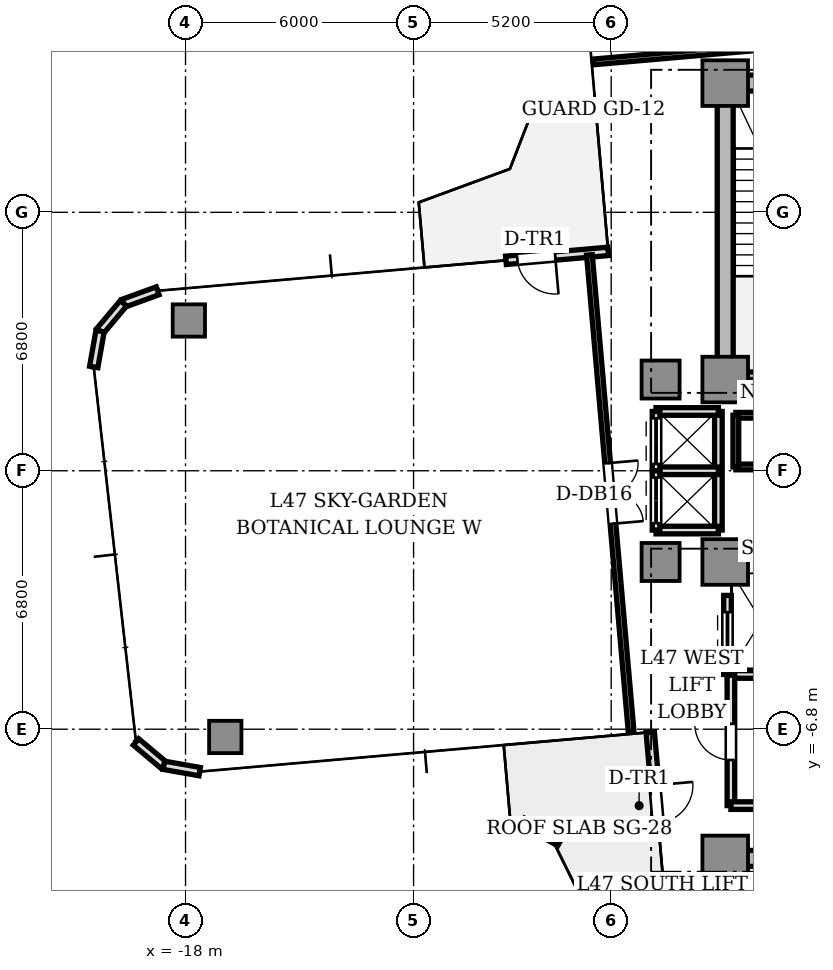
"""IFC4 building model, lengths in metres.
Left out: names, types, materials, properties, quantities, classifications, styles, units other than length and angle.
Written with IfcOpenShell. Run it as: python <this file> out.ifc"""

import sys

from ifc_helpers import new_model, si_unit, direction, frame, frame_2d, origin, origin_2d, place, context, subcontext, project, spatial, rectangle, extrude, source, transform, mapped, element, fill, save


model = new_model("IFC4")
c1 = context("Model", 3, precision=1e-05, world=origin(), true_north=direction((0.0, 1.0)))
c2 = subcontext(c1, "Body", "Model", "MODEL_VIEW")
j1 = project(units=[si_unit("LENGTHUNIT", "METRE"), si_unit("PLANEANGLEUNIT", "RADIAN")], contexts=[c1])
p1 = place(None, origin())
s1 = spatial("IfcSite", under=j1, at=p1, CompositionType="ELEMENT")
p2 = place(p1, origin())
s2 = spatial("IfcBuilding", under=s1, at=p2, CompositionType="ELEMENT")
p3 = place(p2, frame((0.0, 0.0, 170.7)))
s3 = spatial("IfcBuildingStorey", under=s2, at=p3, CompositionType="ELEMENT", Elevation=170.7)
p4 = place(p3, frame((-3.55, 10.2, 0.0), z_axis=(0.0, 0.0, 1.0), x_axis=(1.0, 0.0, 0.0)))
e1 = element("IfcWall", 1, at=p4, inside=s3, PredefinedType="SHEAR", context=c2, shape_type="SweptSolid", body=[
    extrude(rectangle(XDim=7.1, YDim=0.42, at=frame_2d((3.55, 0.0))), origin(), (0.0, 0.0, 1.0), 4.26),
])
p5 = place(p3, frame((-3.8, 2.85, 0.0), z_axis=(0.0, 0.0, 1.0), x_axis=(0.0, 1.0, 0.0)))
e2 = element("IfcWall", 2, at=p5, inside=s3, PredefinedType="SHEAR", context=c2, shape_type="SweptSolid", body=[
    extrude(rectangle(XDim=6.9, YDim=0.42, at=frame_2d((3.45, 0.0))), origin(), (0.0, 0.0, 1.0), 4.26),
])
p6 = place(p3, frame((-3.55, -10.2, 0.0), z_axis=(0.0, 0.0, 1.0), x_axis=(1.0, 0.0, 0.0)))
e3 = element("IfcWall", 3, at=p6, inside=s3, PredefinedType="SHEAR", context=c2, shape_type="SweptSolid", body=[
    extrude(rectangle(XDim=7.1, YDim=0.42, at=frame_2d((3.55, 0.0))), origin(), (0.0, 0.0, 1.0), 4.26),
])
m1 = source(origin(), c2, "Body", "SweptSolid", [
    extrude(rectangle(XDim=1.2, YDim=1.2, at=origin_2d()), origin(), (0.0, 0.0, 1.0), 4.26),
])
for number, where, z_axis, x_axis in (
    (4, (-3.8, 2.4, 0.0), (0.0, 0.0, 1.0), (1.0, 0.0, 0.0)),
    (5, (-3.8, 10.2, 0.0), (0.0, 0.0, 1.0), (1.0, 0.0, 0.0)),
    (6, (-3.8, -2.4, 0.0), (0.0, 0.0, 1.0), (1.0, 0.0, 0.0)),
    (7, (-3.8, -10.2, 0.0), (0.0, 0.0, 1.0), (1.0, 0.0, 0.0)),
):
    element("IfcColumn", number, at=place(p3, frame(where, z_axis=z_axis, x_axis=x_axis)), inside=s3, PredefinedType="COLUMN", context=c2, shape_type="MappedRepresentation", body=[
        mapped(m1, transform((0.0, 0.0, 0.0), scale=1.0)),
    ])
m2 = source(origin(), c2, "Body", "SweptSolid", [
    extrude(rectangle(XDim=1.0, YDim=1.0, at=origin_2d()), origin(), (0.0, 0.0, 1.0), 4.26),
])
for number, where, z_axis, x_axis in (
    (8, (-5.5, 2.4, 0.0), (0.0, 0.0, 1.0), (1.0, 0.0, 0.0)),
    (9, (-5.5, -2.4, 0.0), (0.0, 0.0, 1.0), (1.0, 0.0, 0.0)),
):
    element("IfcColumn", number, at=place(p3, frame(where, z_axis=z_axis, x_axis=x_axis)), inside=s3, PredefinedType="COLUMN", context=c2, shape_type="MappedRepresentation", body=[
        mapped(m2, transform((0.0, 0.0, 0.0), scale=1.0)),
    ])
m3 = source(origin(), c2, "Body", "SweptSolid", [
    extrude(rectangle(XDim=0.85, YDim=0.85, at=origin_2d()), origin(), (0.0, 0.0, 1.0), 4.26),
])
for number, where, z_axis, x_axis in (
    (10, (-17.913, 3.954, 0.0), (0.0, 0.0, 1.0), (1.0, 0.0, 0.0)),
    (11, (-16.954, -7.004, 0.0), (0.0, 0.0, 1.0), (1.0, 0.0, 0.0)),
):
    element("IfcColumn", number, at=place(p3, frame(where, z_axis=z_axis, x_axis=x_axis)), inside=s3, PredefinedType="COLUMN", context=c2, shape_type="MappedRepresentation", body=[
        mapped(m3, transform((0.0, 0.0, 0.0), scale=1.0)),
    ])
p7 = place(p3, frame((-6.879, 5.772, 0.0), z_axis=(0.0, 0.0, 1.0), x_axis=(-0.996193619346, -0.087168071984, 0.0)))
e12 = element("IfcWall", 12, at=p7, inside=s3, PredefinedType="STANDARD", context=c2, shape_type="SweptSolid", body=[
    extrude(rectangle(XDim=2.7, YDim=0.22, at=frame_2d((1.35, 0.0))), origin(), (0.0, 0.0, 1.0), 4.26),
])
p8 = place(p7, frame((1.4, 0.0, 0.0)))
e13 = element("IfcOpeningElement", 13, at=p8, cuts=e12, PredefinedType="OPENING", context=c2, shape_type="SweptSolid", body=[
    extrude(rectangle(XDim=1.0, YDim=2.2, at=frame_2d((0.5, 1.1))), frame((0.0, 0.12, 0.0), z_axis=(0.0, -1.0, 0.0), x_axis=(1.0, 0.0, 0.0)), (0.0, 0.0, 1.0), 0.24),
])
p9 = place(p3, frame((-18.734, 4.735, 0.0), z_axis=(0.0, 0.0, 1.0), x_axis=(-0.939741306239, -0.34188635151, 0.0)))
e14 = element("IfcWall", 14, at=p9, inside=s3, PredefinedType="STANDARD", context=c2, shape_type="SweptSolid", body=[
    extrude(rectangle(XDim=0.958, YDim=0.22, at=frame_2d((0.479, 0.0))), origin(), (0.0, 0.0, 1.0), 4.26),
])
for number, where, z_axis, x_axis in (
    (15, (-19.634, 4.408, 0.0), (0.0, 0.0, 1.0), (-0.643, -0.766, 0.0)),
    (16, (-20.25, 3.674, 0.0), (0.0, 0.0, 1.0), (-0.174, -0.985, 0.0)),
):
    element("IfcWall", number, at=place(p3, frame(where, z_axis=z_axis, x_axis=x_axis)), inside=s3, PredefinedType="STANDARD", context=c2, shape_type="SweptSolid", body=[
        extrude(rectangle(XDim=0.958, YDim=0.22, at=frame_2d((0.479, 0.0))), origin(), (0.0, 0.0, 1.0), 4.26),
    ])
p10 = place(p3, frame((-19.304, -7.135, 0.0), z_axis=(0.0, 0.0, 1.0), x_axis=(0.766001159887, -0.642839189107, 0.0)))
e17 = element("IfcWall", 17, at=p10, inside=s3, PredefinedType="STANDARD", context=c2, shape_type="SweptSolid", body=[
    extrude(rectangle(XDim=0.958, YDim=0.22, at=frame_2d((0.479, 0.0))), origin(), (0.0, 0.0, 1.0), 4.26),
])
p11 = place(p3, frame((-18.57, -7.75, 0.0), z_axis=(0.0, 0.0, 1.0), x_axis=(0.984770724397, -0.173858046606, 0.0)))
e18 = element("IfcWall", 18, at=p11, inside=s3, PredefinedType="STANDARD", context=c2, shape_type="SweptSolid", body=[
    extrude(rectangle(XDim=0.958, YDim=0.22, at=frame_2d((0.479, 0.0))), origin(), (0.0, 0.0, 1.0), 4.26),
])
p12 = place(p3, frame((-5.772, -6.879, 0.0), z_axis=(0.0, 0.0, 1.0), x_axis=(0.087168071984, -0.996193619346, 0.0)))
e19 = element("IfcWall", 19, at=p12, inside=s3, PredefinedType="STANDARD", context=c2, shape_type="SweptSolid", body=[
    extrude(rectangle(XDim=2.7, YDim=0.22, at=frame_2d((1.35, 0.0))), origin(), (0.0, 0.0, 1.0), 4.26),
])
p13 = place(p12, frame((1.4, 0.0, 0.0)))
e20 = element("IfcOpeningElement", 20, at=p13, cuts=e19, PredefinedType="OPENING", context=c2, shape_type="SweptSolid", body=[
    extrude(rectangle(XDim=1.0, YDim=2.2, at=frame_2d((0.5, 1.1))), frame((0.0, 0.12, 0.0), z_axis=(0.0, -1.0, 0.0), x_axis=(1.0, 0.0, 0.0)), (0.0, 0.0, 1.0), 0.24),
])
p14 = place(p3, frame((-9.129, -9.23, 0.0), z_axis=(0.0, 0.0, 1.0), x_axis=(0.870497588791, -0.492172680986, 0.0)))
e21 = element("IfcWall", 21, at=p14, inside=s3, PredefinedType="PARAPET", context=c2, shape_type="SweptSolid", body=[
    extrude(rectangle(XDim=1.115, YDim=0.2, at=frame_2d((0.558, 0.0))), origin(), (0.0, 0.0, 1.0), 0.65),
])
p15 = place(p3, frame((-3.72, 2.5, 0.0), z_axis=(0.0, 0.0, 1.0), x_axis=(1.0, 0.0, 0.0)))
e22 = element("IfcWall", 22, at=p15, inside=s3, PredefinedType="SOLIDWALL", context=c2, shape_type="SweptSolid", body=[
    extrude(rectangle(XDim=3.72, YDim=0.2, at=frame_2d((1.86, 0.0))), origin(), (0.0, 0.0, 1.0), 4.26),
])
p16 = place(p3, frame((-3.74, -5.36, 0.0), z_axis=(0.0, 0.0, 1.0), x_axis=(1.0, 0.0, 0.0)))
e23 = element("IfcWall", 23, at=p16, inside=s3, PredefinedType="SOLIDWALL", context=c2, shape_type="SweptSolid", body=[
    extrude(rectangle(XDim=1.74, YDim=0.2, at=frame_2d((0.87, 0.0))), origin(), (0.0, 0.0, 1.0), 3.81),
])
p17 = place(p3, frame((-3.74, -5.36, 0.0), z_axis=(0.0, 0.0, 1.0), x_axis=(0.0, 1.0, 0.0)))
e24 = element("IfcWall", 24, at=p17, inside=s3, PredefinedType="SOLIDWALL", context=c2, shape_type="SweptSolid", body=[
    extrude(rectangle(XDim=2.08, YDim=0.2, at=frame_2d((1.04, 0.0))), origin(), (0.0, 0.0, 1.0), 3.81),
])
p18 = place(p17, frame((0.44, 0.0, 0.0)))
e25 = element("IfcOpeningElement", 25, at=p18, cuts=e24, PredefinedType="OPENING", context=c2, shape_type="SweptSolid", body=[
    extrude(rectangle(XDim=1.2, YDim=2.2, at=frame_2d((0.6, 1.1))), frame((0.0, 0.11, 0.0), z_axis=(0.0, -1.0, 0.0), x_axis=(1.0, 0.0, 0.0)), (0.0, 0.0, 1.0), 0.22),
])
p19 = place(p3, frame((-3.98, -1.56, 0.0), z_axis=(0.0, 0.0, 1.0), x_axis=(0.0, 1.0, 0.0)))
e26 = element("IfcWall", 26, at=p19, inside=s3, PredefinedType="SOLIDWALL", context=c2, shape_type="SweptSolid", body=[
    extrude(rectangle(XDim=3.12, YDim=0.2, at=frame_2d((1.56, 0.0))), origin(), (0.0, 0.0, 1.0), 3.43),
])
for number, where, z_axis, x_axis in (
    (27, (-5.62, 1.56, 0.0), (0.0, 0.0, 1.0), (1.0, 0.0, 0.0)),
    (28, (-5.62, -1.56, 0.0), (0.0, 0.0, 1.0), (1.0, 0.0, 0.0)),
    (29, (-5.62, 0.0, 0.0), (0.0, 0.0, 1.0), (1.0, 0.0, 0.0)),
):
    element("IfcWall", number, at=place(p3, frame(where, z_axis=z_axis, x_axis=x_axis)), inside=s3, PredefinedType="SOLIDWALL", context=c2, shape_type="SweptSolid", body=[
        extrude(rectangle(XDim=1.64, YDim=0.2, at=frame_2d((0.82, 0.0))), origin(), (0.0, 0.0, 1.0), 3.81),
    ])
p20 = place(p3, frame((-5.62, 0.0, 0.0), z_axis=(0.0, 0.0, 1.0), x_axis=(0.0, 1.0, 0.0)))
e30 = element("IfcWall", 30, at=p20, inside=s3, PredefinedType="SOLIDWALL", context=c2, shape_type="SweptSolid", body=[
    extrude(rectangle(XDim=1.56, YDim=0.2, at=frame_2d((0.78, 0.0))), origin(), (0.0, 0.0, 1.0), 3.81),
])
p21 = place(p20, frame((0.18, 0.0, 0.0)))
e31 = element("IfcOpeningElement", 31, at=p21, cuts=e30, PredefinedType="OPENING", context=c2, shape_type="SweptSolid", body=[
    extrude(rectangle(XDim=1.2, YDim=2.2, at=frame_2d((0.6, 1.1))), frame((0.0, 0.11, 0.0), z_axis=(0.0, -1.0, 0.0), x_axis=(1.0, 0.0, 0.0)), (0.0, 0.0, 1.0), 0.22),
])
p22 = place(p3, frame((-5.62, -1.56, 0.0), z_axis=(0.0, 0.0, 1.0), x_axis=(0.0, 1.0, 0.0)))
e32 = element("IfcWall", 32, at=p22, inside=s3, PredefinedType="SOLIDWALL", context=c2, shape_type="SweptSolid", body=[
    extrude(rectangle(XDim=1.56, YDim=0.2, at=frame_2d((0.78, 0.0))), origin(), (0.0, 0.0, 1.0), 3.81),
])
p23 = place(p22, frame((0.18, 0.0, 0.0)))
e33 = element("IfcOpeningElement", 33, at=p23, cuts=e32, PredefinedType="OPENING", context=c2, shape_type="SweptSolid", body=[
    extrude(rectangle(XDim=1.2, YDim=2.2, at=frame_2d((0.6, 1.1))), frame((0.0, 0.11, 0.0), z_axis=(0.0, -1.0, 0.0), x_axis=(1.0, 0.0, 0.0)), (0.0, 0.0, 1.0), 0.22),
])
p24 = place(p3, frame((-3.65, -8.81, 0.0), z_axis=(0.0, 0.0, 1.0), x_axis=(0.0, 1.0, 0.0)))
e34 = element("IfcWall", 34, at=p24, inside=s3, PredefinedType="SOLIDWALL", context=c2, shape_type="SweptSolid", body=[
    extrude(rectangle(XDim=3.43, YDim=0.2, at=frame_2d((1.715, 0.0))), origin(), (0.0, 0.0, 1.0), 3.81),
])
p25 = place(p24, frame((1.2, 0.0, 0.0)))
e35 = element("IfcOpeningElement", 35, at=p25, cuts=e34, PredefinedType="OPENING", context=c2, shape_type="SweptSolid", body=[
    extrude(rectangle(XDim=0.95, YDim=2.15, at=frame_2d((0.475, 1.075))), frame((0.0, 0.11, 0.0), z_axis=(0.0, -1.0, 0.0), x_axis=(1.0, 0.0, 0.0)), (0.0, 0.0, 1.0), 0.22),
])
p26 = place(p3, frame((-3.65, -8.81, 0.0), z_axis=(0.0, 0.0, 1.0), x_axis=(1.0, 0.0, 0.0)))
e36 = element("IfcWall", 36, at=p26, inside=s3, PredefinedType="SOLIDWALL", context=c2, shape_type="SweptSolid", body=[
    extrude(rectangle(XDim=1.67, YDim=0.2, at=frame_2d((0.835, 0.0))), origin(), (0.0, 0.0, 1.0), 3.81),
])
p27 = place(p3, frame((-3.52, 0.1, 0.0), z_axis=(0.0, 0.0, 1.0), x_axis=(1.0, 0.0, 0.0)))
e37 = element("IfcWall", 37, at=p27, inside=s3, PredefinedType="PARTITIONING", context=c2, shape_type="SweptSolid", body=[
    extrude(rectangle(XDim=5.68, YDim=0.15, at=frame_2d((2.84, 0.0))), origin(), (0.0, 0.0, 1.0), 3.81),
])
p28 = place(p3, frame((-3.52, 1.46, 0.0), z_axis=(0.0, 0.0, 1.0), x_axis=(1.0, 0.0, 0.0)))
e38 = element("IfcWall", 38, at=p28, inside=s3, PredefinedType="PARTITIONING", context=c2, shape_type="SweptSolid", body=[
    extrude(rectangle(XDim=5.68, YDim=0.15, at=frame_2d((2.84, 0.0))), origin(), (0.0, 0.0, 1.0), 3.81),
])
p29 = place(p28, frame((1.15, 0.0, 0.0)))
e39 = element("IfcOpeningElement", 39, at=p29, cuts=e38, PredefinedType="OPENING", context=c2, shape_type="SweptSolid", body=[
    extrude(rectangle(XDim=0.85, YDim=2.1, at=frame_2d((0.425, 1.05))), frame((0.0, 0.085, 0.0), z_axis=(0.0, -1.0, 0.0), x_axis=(1.0, 0.0, 0.0)), (0.0, 0.0, 1.0), 0.17),
])
p30 = place(p28, frame((4.15, 0.0, 0.0)))
e40 = element("IfcOpeningElement", 40, at=p30, cuts=e38, PredefinedType="OPENING", context=c2, shape_type="SweptSolid", body=[
    extrude(rectangle(XDim=0.85, YDim=2.1, at=frame_2d((0.425, 1.05))), frame((0.0, 0.085, 0.0), z_axis=(0.0, -1.0, 0.0), x_axis=(1.0, 0.0, 0.0)), (0.0, 0.0, 1.0), 0.17),
])
p31 = place(p3, frame((-3.52, 0.1, 0.0), z_axis=(0.0, 0.0, 1.0), x_axis=(0.0, 1.0, 0.0)))
e41 = element("IfcWall", 41, at=p31, inside=s3, PredefinedType="PARTITIONING", context=c2, shape_type="SweptSolid", body=[
    extrude(rectangle(XDim=1.36, YDim=0.15, at=frame_2d((0.68, 0.0))), origin(), (0.0, 0.0, 1.0), 3.43),
])
p32 = place(p3, frame((5.287, 11.856, 0.0), z_axis=(0.0, 0.0, 1.0), x_axis=(-0.996194790044, -0.087154691724, 0.0)))
e42 = element("IfcWall", 42, at=p32, inside=s3, PredefinedType="PARTITIONING", context=c2, shape_type="SweptSolid", body=[
    extrude(rectangle(XDim=12.6, YDim=0.15, at=frame_2d((6.3, 0.0))), origin(), (0.0, 0.0, 1.0), 3.81),
])
p33 = place(p32, frame((5.5, 0.0, 0.0)))
e43 = element("IfcOpeningElement", 43, at=p33, cuts=e42, PredefinedType="OPENING", context=c2, shape_type="SweptSolid", body=[
    extrude(rectangle(XDim=1.6, YDim=2.25, at=frame_2d((0.8, 1.125))), frame((0.0, 0.085, 0.0), z_axis=(0.0, -1.0, 0.0), x_axis=(1.0, 0.0, 0.0)), (0.0, 0.0, 1.0), 0.17),
])
p34 = place(p3, frame((-7.373, 5.679, 0.0), z_axis=(0.0, 0.0, 1.0), x_axis=(0.087154691724, -0.996194790044, 0.0)))
e44 = element("IfcWall", 44, at=p34, inside=s3, PredefinedType="PARTITIONING", context=c2, shape_type="SweptSolid", body=[
    extrude(rectangle(XDim=12.6, YDim=0.15, at=frame_2d((6.3, 0.0))), origin(), (0.0, 0.0, 1.0), 3.81),
])
p35 = place(p34, frame((5.5, 0.0, 0.0)))
e45 = element("IfcOpeningElement", 45, at=p35, cuts=e44, PredefinedType="OPENING", context=c2, shape_type="SweptSolid", body=[
    extrude(rectangle(XDim=1.6, YDim=2.25, at=frame_2d((0.8, 1.125))), frame((0.0, 0.085, 0.0), z_axis=(0.0, -1.0, 0.0), x_axis=(1.0, 0.0, 0.0)), (0.0, 0.0, 1.0), 0.17),
])
p36 = place(p3, frame((-3.095, -11.664, 0.0), z_axis=(0.0, 0.0, 1.0), x_axis=(0.996196061386, 0.087140158824, 0.0)))
e46 = element("IfcWall", 46, at=p36, inside=s3, PredefinedType="PARTITIONING", context=c2, shape_type="SweptSolid", body=[
    extrude(rectangle(XDim=10.4, YDim=0.18, at=frame_2d((5.2, 0.0))), origin(), (0.0, 0.0, 1.0), 3.81),
])
m4 = source(origin(), c2, "Body", "SweptSolid", [
    extrude(rectangle(XDim=1.0, YDim=0.05, at=origin_2d()), origin(), (0.0, 0.0, 1.0), 2.2),
])
p37 = place(p8, frame((0.5, 0.0, 0.0)))
e47 = element("IfcDoor", 47, at=p37, inside=s3, OperationType="SINGLE_SWING_LEFT", PredefinedType="DOOR", context=c2, shape_type="MappedRepresentation", body=[
    mapped(m4, transform((0.0, 0.0, 0.0), scale=1.0)),
])
fill(e13, e47)
p38 = place(p13, frame((0.5, 0.0, 0.0)))
e48 = element("IfcDoor", 48, at=p38, inside=s3, OperationType="SINGLE_SWING_LEFT", PredefinedType="DOOR", context=c2, shape_type="MappedRepresentation", body=[
    mapped(m4, transform((0.0, 0.0, 0.0), scale=1.0)),
])
fill(e20, e48)
m5 = source(origin(), c2, "Body", "SweptSolid", [
    extrude(rectangle(XDim=1.2, YDim=0.05, at=origin_2d()), origin(), (0.0, 0.0, 1.0), 2.2),
])
p39 = place(p18, frame((0.6, 0.0, 0.0)))
e49 = element("IfcDoor", 49, at=p39, inside=s3, OperationType="DOUBLE_DOOR_SLIDING", PredefinedType="DOOR", context=c2, shape_type="MappedRepresentation", body=[
    mapped(m5, transform((0.0, 0.0, 0.0), scale=1.0)),
])
fill(e25, e49)
p40 = place(p21, frame((0.6, 0.0, 0.0)))
e50 = element("IfcDoor", 50, at=p40, inside=s3, OperationType="DOUBLE_DOOR_SLIDING", PredefinedType="DOOR", context=c2, shape_type="MappedRepresentation", body=[
    mapped(m5, transform((0.0, 0.0, 0.0), scale=1.0)),
])
fill(e31, e50)
p41 = place(p23, frame((0.6, 0.0, 0.0)))
e51 = element("IfcDoor", 51, at=p41, inside=s3, OperationType="DOUBLE_DOOR_SLIDING", PredefinedType="DOOR", context=c2, shape_type="MappedRepresentation", body=[
    mapped(m5, transform((0.0, 0.0, 0.0), scale=1.0)),
])
fill(e33, e51)
m6 = source(origin(), c2, "Body", "SweptSolid", [
    extrude(rectangle(XDim=0.95, YDim=0.05, at=origin_2d()), origin(), (0.0, 0.0, 1.0), 2.15),
])
p42 = place(p25, frame((0.475, 0.0, 0.0)))
e52 = element("IfcDoor", 52, at=p42, inside=s3, OperationType="SINGLE_SWING_RIGHT", PredefinedType="DOOR", context=c2, shape_type="MappedRepresentation", body=[
    mapped(m6, transform((0.0, 0.0, 0.0), scale=1.0)),
])
fill(e35, e52)
m7 = source(origin(), c2, "Body", "SweptSolid", [
    extrude(rectangle(XDim=1.6, YDim=0.05, at=origin_2d()), origin(), (0.0, 0.0, 1.0), 2.25),
])
p43 = place(p35, frame((0.8, 0.0, 0.0)))
e53 = element("IfcDoor", 53, at=p43, inside=s3, OperationType="DOUBLE_DOOR_SINGLE_SWING", PredefinedType="DOOR", context=c2, shape_type="MappedRepresentation", body=[
    mapped(m7, transform((0.0, 0.0, 0.0), scale=1.0)),
])
fill(e45, e53)
save(model, sys.argv[1])
